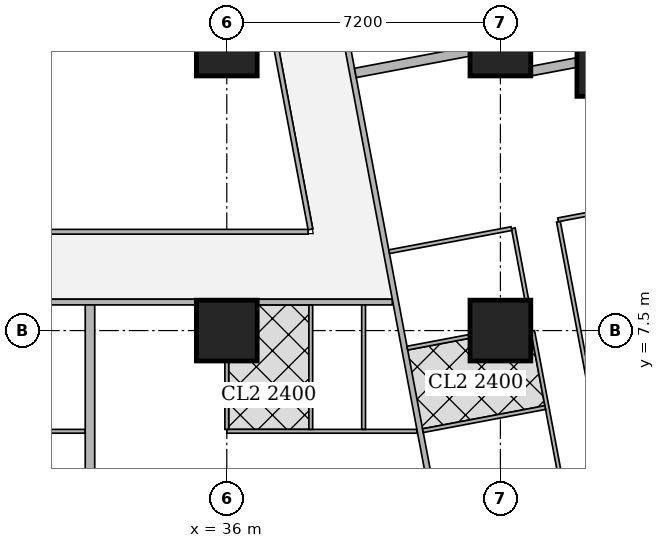
"""IFC4 building model, lengths in metres.
Left out: names, types, materials, properties, quantities, classifications, styles, units other than length and angle.
Written with IfcOpenShell. Run it as: python <this file> out.ifc"""

import sys

from ifc_helpers import new_model, si_unit, direction, frame, frame_2d, origin, origin_2d, place, context, subcontext, project, spatial, rectangle, extrude, element, fill, save


model = new_model("IFC4")
c1 = context("Model", 3, precision=1e-05, world=origin(), true_north=direction((0.0, 1.0)))
c2 = subcontext(c1, "Body", "Model", "MODEL_VIEW")
j1 = project(units=[si_unit("LENGTHUNIT", "METRE"), si_unit("PLANEANGLEUNIT", "RADIAN")], contexts=[c1])
p1 = place(None, origin())
s1 = spatial("IfcSite", under=j1, at=p1, CompositionType="ELEMENT")
p2 = place(p1, origin())
s2 = spatial("IfcBuilding", under=s1, at=p2, CompositionType="ELEMENT")
p3 = place(p2, frame((0.0, 0.0, 100.4)))
s3 = spatial("IfcBuildingStorey", under=s2, at=p3, CompositionType="ELEMENT", Elevation=100.4)
for number, where, z_axis, x_axis in (
    (1, (36.0, 7.5, 0.0), (0.0, 0.0, 1.0), (1.0, 0.0, 0.0)),
    (2, (43.2, 7.5, 0.0), (0.0, 0.0, 1.0), (1.0, 0.0, 0.0)),
    (3, (36.0, 15.0, 0.0), (0.0, 0.0, 1.0), (1.0, 0.0, 0.0)),
    (4, (43.2, 15.0, 0.0), (0.0, 0.0, 1.0), (1.0, 0.0, 0.0)),
):
    element("IfcColumn", number, at=place(p3, frame(where, z_axis=z_axis, x_axis=x_axis)), inside=s3, PredefinedType="COLUMN", context=c2, shape_type="SweptSolid", body=[
        extrude(rectangle(XDim=1.6, YDim=1.6, at=origin_2d()), origin(), (0.0, 0.0, 1.0), 3.75),
    ])
p4 = place(p3, frame((46.314, 14.763, 0.0), z_axis=(0.0, 0.0, 1.0), x_axis=(1.0, 0.0, 0.0)))
e5 = element("IfcColumn", 5, at=p4, inside=s3, PredefinedType="COLUMN", context=c2, shape_type="SweptSolid", body=[
    extrude(rectangle(XDim=2.2, YDim=2.2, at=origin_2d()), origin(), (0.0, 0.0, 1.0), 3.75),
])
p5 = place(p3, frame((50.653, 2.703, 0.0), z_axis=(0.0, 0.0, 1.0), x_axis=(-0.185612026696, 0.982623109613, 0.0)))
e6 = element("IfcWall", 6, at=p5, inside=s3, PredefinedType="SOLIDWALL", context=c2, shape_type="SweptSolid", body=[
    extrude(rectangle(XDim=41.393, YDim=0.2, at=frame_2d((20.697, 0.0))), origin(), (0.0, 0.0, 1.0), 3.5),
])
p6 = place(p5, frame((1.633, 0.0, 0.9)))
e7 = element("IfcOpeningElement", 7, at=p6, cuts=e6, PredefinedType="OPENING", context=c2, shape_type="SweptSolid", body=[
    extrude(rectangle(XDim=1.8, YDim=1.5, at=frame_2d((0.9, 0.75))), frame((0.0, 0.11, 0.0), z_axis=(0.0, -1.0, 0.0), x_axis=(1.0, 0.0, 0.0)), (0.0, 0.0, 1.0), 0.22),
])
p7 = place(p5, frame((6.032, 0.0, 0.9)))
e8 = element("IfcOpeningElement", 8, at=p7, cuts=e6, PredefinedType="OPENING", context=c2, shape_type="SweptSolid", body=[
    extrude(rectangle(XDim=1.8, YDim=1.5, at=frame_2d((0.9, 0.75))), frame((0.0, 0.11, 0.0), z_axis=(0.0, -1.0, 0.0), x_axis=(1.0, 0.0, 0.0)), (0.0, 0.0, 1.0), 0.22),
])
p8 = place(p5, frame((9.848, 0.0, 0.9)))
e9 = element("IfcOpeningElement", 9, at=p8, cuts=e6, PredefinedType="OPENING", context=c2, shape_type="SweptSolid", body=[
    extrude(rectangle(XDim=1.8, YDim=1.5, at=frame_2d((0.9, 0.75))), frame((0.0, 0.11, 0.0), z_axis=(0.0, -1.0, 0.0), x_axis=(1.0, 0.0, 0.0)), (0.0, 0.0, 1.0), 0.22),
])
p9 = place(p5, frame((13.664, 0.0, 0.9)))
e10 = element("IfcOpeningElement", 10, at=p9, cuts=e6, PredefinedType="OPENING", context=c2, shape_type="SweptSolid", body=[
    extrude(rectangle(XDim=1.8, YDim=1.5, at=frame_2d((0.9, 0.75))), frame((0.0, 0.11, 0.0), z_axis=(0.0, -1.0, 0.0), x_axis=(1.0, 0.0, 0.0)), (0.0, 0.0, 1.0), 0.22),
])
p10 = place(p5, frame((17.481, 0.0, 0.9)))
e11 = element("IfcOpeningElement", 11, at=p10, cuts=e6, PredefinedType="OPENING", context=c2, shape_type="SweptSolid", body=[
    extrude(rectangle(XDim=1.8, YDim=1.5, at=frame_2d((0.9, 0.75))), frame((0.0, 0.11, 0.0), z_axis=(0.0, -1.0, 0.0), x_axis=(1.0, 0.0, 0.0)), (0.0, 0.0, 1.0), 0.22),
])
p11 = place(p5, frame((21.297, 0.0, 0.9)))
e12 = element("IfcOpeningElement", 12, at=p11, cuts=e6, PredefinedType="OPENING", context=c2, shape_type="SweptSolid", body=[
    extrude(rectangle(XDim=1.8, YDim=1.5, at=frame_2d((0.9, 0.75))), frame((0.0, 0.11, 0.0), z_axis=(0.0, -1.0, 0.0), x_axis=(1.0, 0.0, 0.0)), (0.0, 0.0, 1.0), 0.22),
])
p12 = place(p5, frame((25.113, 0.0, 0.9)))
e13 = element("IfcOpeningElement", 13, at=p12, cuts=e6, PredefinedType="OPENING", context=c2, shape_type="SweptSolid", body=[
    extrude(rectangle(XDim=1.8, YDim=1.5, at=frame_2d((0.9, 0.75))), frame((0.0, 0.11, 0.0), z_axis=(0.0, -1.0, 0.0), x_axis=(1.0, 0.0, 0.0)), (0.0, 0.0, 1.0), 0.22),
])
p13 = place(p5, frame((28.93, 0.0, 0.9)))
e14 = element("IfcOpeningElement", 14, at=p13, cuts=e6, PredefinedType="OPENING", context=c2, shape_type="SweptSolid", body=[
    extrude(rectangle(XDim=1.8, YDim=1.5, at=frame_2d((0.9, 0.75))), frame((0.0, 0.11, 0.0), z_axis=(0.0, -1.0, 0.0), x_axis=(1.0, 0.0, 0.0)), (0.0, 0.0, 1.0), 0.22),
])
p14 = place(p5, frame((32.746, 0.0, 0.9)))
e15 = element("IfcOpeningElement", 15, at=p14, cuts=e6, PredefinedType="OPENING", context=c2, shape_type="SweptSolid", body=[
    extrude(rectangle(XDim=1.8, YDim=1.5, at=frame_2d((0.9, 0.75))), frame((0.0, 0.11, 0.0), z_axis=(0.0, -1.0, 0.0), x_axis=(1.0, 0.0, 0.0)), (0.0, 0.0, 1.0), 0.22),
])
p15 = place(p5, frame((36.481, 0.0, 0.9)))
e16 = element("IfcOpeningElement", 16, at=p15, cuts=e6, PredefinedType="OPENING", context=c2, shape_type="SweptSolid", body=[
    extrude(rectangle(XDim=1.8, YDim=1.5, at=frame_2d((0.9, 0.75))), frame((0.0, 0.11, 0.0), z_axis=(0.0, -1.0, 0.0), x_axis=(1.0, 0.0, 0.0)), (0.0, 0.0, 1.0), 0.22),
])
p16 = place(p3, frame((40.356, 8.25, 0.0), z_axis=(0.0, 0.0, 1.0), x_axis=(-1.0, 0.0, 0.0)))
e17 = element("IfcWall", 17, at=p16, inside=s3, PredefinedType="SOLIDWALL", context=c2, shape_type="SweptSolid", body=[
    extrude(rectangle(XDim=3.555, YDim=0.15, at=frame_2d((1.777, 0.0))), origin(), (0.0, 0.0, 1.0), 3.5),
])
p17 = place(p3, frame((35.199, 8.25, 0.0), z_axis=(0.0, 0.0, 1.0), x_axis=(-1.0, 0.0, 0.0)))
e18 = element("IfcWall", 18, at=p17, inside=s3, PredefinedType="SOLIDWALL", context=c2, shape_type="SweptSolid", body=[
    extrude(rectangle(XDim=5.598, YDim=0.15, at=frame_2d((2.799, 0.0))), origin(), (0.0, 0.0, 1.0), 3.5),
])
p18 = place(p17, frame((0.699, 0.0, 0.0)))
e19 = element("IfcOpeningElement", 19, at=p18, cuts=e18, PredefinedType="OPENING", context=c2, shape_type="SweptSolid", body=[
    extrude(rectangle(XDim=1.0, YDim=2.1, at=frame_2d((0.5, 1.05))), frame((0.0, 0.085, 0.0), z_axis=(0.0, -1.0, 0.0), x_axis=(1.0, 0.0, 0.0)), (0.0, 0.0, 1.0), 0.17),
])
p19 = place(p3, frame((33.382, 45.65, 0.0), z_axis=(0.0, 0.0, 1.0), x_axis=(0.185593544777, -0.982626600565, 0.0)))
e20 = element("IfcWall", 20, at=p19, inside=s3, PredefinedType="SOLIDWALL", context=c2, shape_type="SweptSolid", body=[
    extrude(rectangle(XDim=47.118, YDim=0.15, at=frame_2d((23.559, 0.0))), origin(), (0.0, 0.0, 1.0), 2.2),
])
p20 = place(p19, frame((10.662, 0.0, 0.0)))
e21 = element("IfcOpeningElement", 21, at=p20, cuts=e20, PredefinedType="OPENING", context=c2, shape_type="SweptSolid", body=[
    extrude(rectangle(XDim=1.0, YDim=2.1, at=frame_2d((0.5, 1.05))), frame((0.0, 0.085, 0.0), z_axis=(0.0, -1.0, 0.0), x_axis=(1.0, 0.0, 0.0)), (0.0, 0.0, 1.0), 0.17),
])
p21 = place(p19, frame((15.237, 0.0, 0.0)))
e22 = element("IfcOpeningElement", 22, at=p21, cuts=e20, PredefinedType="OPENING", context=c2, shape_type="SweptSolid", body=[
    extrude(rectangle(XDim=1.0, YDim=2.1, at=frame_2d((0.5, 1.05))), frame((0.0, 0.085, 0.0), z_axis=(0.0, -1.0, 0.0), x_axis=(1.0, 0.0, 0.0)), (0.0, 0.0, 1.0), 0.17),
])
p22 = place(p19, frame((27.341, 0.0, 0.0)))
e23 = element("IfcOpeningElement", 23, at=p22, cuts=e20, PredefinedType="OPENING", context=c2, shape_type="SweptSolid", body=[
    extrude(rectangle(XDim=1.0, YDim=2.1, at=frame_2d((0.5, 1.05))), frame((0.0, 0.085, 0.0), z_axis=(0.0, -1.0, 0.0), x_axis=(1.0, 0.0, 0.0)), (0.0, 0.0, 1.0), 0.17),
])
p23 = place(p19, frame((33.833, 0.0, 0.0)))
e24 = element("IfcOpeningElement", 24, at=p23, cuts=e20, PredefinedType="OPENING", context=c2, shape_type="SweptSolid", body=[
    extrude(rectangle(XDim=1.0, YDim=2.1, at=frame_2d((0.5, 1.05))), frame((0.0, 0.085, 0.0), z_axis=(0.0, -1.0, 0.0), x_axis=(1.0, 0.0, 0.0)), (0.0, 0.0, 1.0), 0.17),
])
p24 = place(p3, frame((32.275, 4.85, 0.0), z_axis=(0.0, 0.0, 1.0), x_axis=(-1.0, 0.0, 0.0)))
e25 = element("IfcWall", 25, at=p24, inside=s3, PredefinedType="PARTITIONING", context=c2, shape_type="SweptSolid", body=[
    extrude(rectangle(XDim=7.075, YDim=0.1, at=frame_2d((3.538, 0.0))), origin(), (0.0, 0.0, 1.0), 3.5),
])
p25 = place(p24, frame((5.52, 0.0, 0.0)))
e26 = element("IfcOpeningElement", 26, at=p25, cuts=e25, PredefinedType="OPENING", context=c2, shape_type="SweptSolid", body=[
    extrude(rectangle(XDim=0.9, YDim=2.1, at=frame_2d((0.45, 1.05))), frame((0.0, 0.06, 0.0), z_axis=(0.0, -1.0, 0.0), x_axis=(1.0, 0.0, 0.0)), (0.0, 0.0, 1.0), 0.12),
])
p26 = place(p24, frame((2.225, 0.0, 0.0)))
e27 = element("IfcOpeningElement", 27, at=p26, cuts=e25, PredefinedType="OPENING", context=c2, shape_type="SweptSolid", body=[
    extrude(rectangle(XDim=0.9, YDim=2.1, at=frame_2d((0.45, 1.05))), frame((0.0, 0.06, 0.0), z_axis=(0.0, -1.0, 0.0), x_axis=(1.0, 0.0, 0.0)), (0.0, 0.0, 1.0), 0.12),
])
p27 = place(p24, frame((3.72, 0.0, 0.0)))
e28 = element("IfcOpeningElement", 28, at=p27, cuts=e25, PredefinedType="OPENING", context=c2, shape_type="SweptSolid", body=[
    extrude(rectangle(XDim=0.9, YDim=2.1, at=frame_2d((0.45, 1.05))), frame((0.0, 0.06, 0.0), z_axis=(0.0, -1.0, 0.0), x_axis=(1.0, 0.0, 0.0)), (0.0, 0.0, 1.0), 0.12),
])
p28 = place(p24, frame((0.425, 0.0, 0.0)))
e29 = element("IfcOpeningElement", 29, at=p28, cuts=e25, PredefinedType="OPENING", context=c2, shape_type="SweptSolid", body=[
    extrude(rectangle(XDim=0.9, YDim=2.1, at=frame_2d((0.45, 1.05))), frame((0.0, 0.06, 0.0), z_axis=(0.0, -1.0, 0.0), x_axis=(1.0, 0.0, 0.0)), (0.0, 0.0, 1.0), 0.12),
])
p29 = place(p3, frame((41.002, 4.85, 0.0), z_axis=(0.0, 0.0, 1.0), x_axis=(-1.0, 0.0, 0.0)))
e30 = element("IfcWall", 30, at=p29, inside=s3, PredefinedType="PARTITIONING", context=c2, shape_type="SweptSolid", body=[
    extrude(rectangle(XDim=5.002, YDim=0.1, at=frame_2d((2.501, 0.0))), origin(), (0.0, 0.0, 1.0), 3.5),
])
p30 = place(p29, frame((3.447, 0.0, 0.0)))
e31 = element("IfcOpeningElement", 31, at=p30, cuts=e30, PredefinedType="OPENING", context=c2, shape_type="SweptSolid", body=[
    extrude(rectangle(XDim=0.9, YDim=2.1, at=frame_2d((0.45, 1.05))), frame((0.0, 0.06, 0.0), z_axis=(0.0, -1.0, 0.0), x_axis=(1.0, 0.0, 0.0)), (0.0, 0.0, 1.0), 0.12),
])
p31 = place(p29, frame((0.15, 0.0, 0.0)))
e32 = element("IfcOpeningElement", 32, at=p31, cuts=e30, PredefinedType="OPENING", context=c2, shape_type="SweptSolid", body=[
    extrude(rectangle(XDim=0.9, YDim=2.1, at=frame_2d((0.45, 1.05))), frame((0.0, 0.06, 0.0), z_axis=(0.0, -1.0, 0.0), x_axis=(1.0, 0.0, 0.0)), (0.0, 0.0, 1.0), 0.12),
])
p32 = place(p29, frame((1.647, 0.0, 0.0)))
e33 = element("IfcOpeningElement", 33, at=p32, cuts=e30, PredefinedType="OPENING", context=c2, shape_type="SweptSolid", body=[
    extrude(rectangle(XDim=0.9, YDim=2.1, at=frame_2d((0.45, 1.05))), frame((0.0, 0.06, 0.0), z_axis=(0.0, -1.0, 0.0), x_axis=(1.0, 0.0, 0.0)), (0.0, 0.0, 1.0), 0.12),
])
p33 = place(p3, frame((36.0, 4.9, 0.0), z_axis=(0.0, 0.0, 1.0), x_axis=(0.0, 1.0, 0.0)))
e34 = element("IfcWall", 34, at=p33, inside=s3, PredefinedType="PARTITIONING", context=c2, shape_type="SweptSolid", body=[
    extrude(rectangle(XDim=1.799, YDim=0.1, at=frame_2d((0.899, 0.0))), origin(), (0.0, 0.0, 1.0), 3.5),
])
for number, where, z_axis, x_axis in (
    (35, (39.6, 4.9, 0.0), (0.0, 0.0, 1.0), (0.0, 1.0, 0.0)),
    (36, (38.21, 4.9, 0.0), (0.0, 0.0, 1.0), (0.0, 1.0, 0.0)),
):
    element("IfcWall", number, at=place(p3, frame(where, z_axis=z_axis, x_axis=x_axis)), inside=s3, PredefinedType="PARTITIONING", context=c2, shape_type="SweptSolid", body=[
        extrude(rectangle(XDim=3.275, YDim=0.1, at=frame_2d((1.638, 0.0))), origin(), (0.0, 0.0, 1.0), 3.5),
    ])
p34 = place(p3, frame((32.4, 3.65, 0.0), z_axis=(0.0, 0.0, 1.0), x_axis=(0.0, 1.0, 0.0)))
e37 = element("IfcWall", 37, at=p34, inside=s3, PredefinedType="SOLIDWALL", context=c2, shape_type="SweptSolid", body=[
    extrude(rectangle(XDim=4.525, YDim=0.25, at=frame_2d((2.263, 0.0))), origin(), (0.0, 0.0, 1.0), 3.5),
])
p35 = place(p3, frame((44.727, 10.366, 0.0), z_axis=(0.0, 0.0, 1.0), x_axis=(0.185678775129, -0.982610498858, 0.0)))
e38 = element("IfcWall", 38, at=p35, inside=s3, PredefinedType="PARTITIONING", context=c2, shape_type="SweptSolid", body=[
    extrude(rectangle(XDim=7.421, YDim=0.1, at=frame_2d((3.71, 0.0))), origin(), (0.0, 0.0, 1.0), 3.5),
])
p36 = place(p35, frame((0.151, 0.0, 0.0)))
e39 = element("IfcOpeningElement", 39, at=p36, cuts=e38, PredefinedType="OPENING", context=c2, shape_type="SweptSolid", body=[
    extrude(rectangle(XDim=0.9, YDim=2.1, at=frame_2d((0.45, 1.05))), frame((0.0, 0.06, 0.0), z_axis=(0.0, -1.0, 0.0), x_axis=(1.0, 0.0, 0.0)), (0.0, 0.0, 1.0), 0.12),
])
p37 = place(p35, frame((4.55, 0.0, 0.0)))
e40 = element("IfcOpeningElement", 40, at=p37, cuts=e38, PredefinedType="OPENING", context=c2, shape_type="SweptSolid", body=[
    extrude(rectangle(XDim=0.9, YDim=2.1, at=frame_2d((0.45, 1.05))), frame((0.0, 0.06, 0.0), z_axis=(0.0, -1.0, 0.0), x_axis=(1.0, 0.0, 0.0)), (0.0, 0.0, 1.0), 0.12),
])
p38 = place(p3, frame((43.539, 10.192, 0.0), z_axis=(0.0, 0.0, 1.0), x_axis=(0.185366049966, -0.982669541362, 0.0)))
e41 = element("IfcWall", 41, at=p38, inside=s3, PredefinedType="PARTITIONING", context=c2, shape_type="SweptSolid", body=[
    extrude(rectangle(XDim=1.915, YDim=0.1, at=frame_2d((0.958, 0.0))), origin(), (0.0, 0.0, 1.0), 3.5),
])
p39 = place(p3, frame((44.049, 7.49, 0.0), z_axis=(0.0, 0.0, 1.0), x_axis=(0.185666332607, -0.982612849975, 0.0)))
e42 = element("IfcWall", 42, at=p39, inside=s3, PredefinedType="PARTITIONING", context=c2, shape_type="SweptSolid", body=[
    extrude(rectangle(XDim=4.75, YDim=0.1, at=frame_2d((2.375, 0.0))), origin(), (0.0, 0.0, 1.0), 3.5),
])
p40 = place(p39, frame((0.8, 0.0, 0.0)))
e43 = element("IfcOpeningElement", 43, at=p40, cuts=e42, PredefinedType="OPENING", context=c2, shape_type="SweptSolid", body=[
    extrude(rectangle(XDim=0.9, YDim=2.1, at=frame_2d((0.45, 1.05))), frame((0.0, 0.06, 0.0), z_axis=(0.0, -1.0, 0.0), x_axis=(1.0, 0.0, 0.0)), (0.0, 0.0, 1.0), 0.12),
])
p41 = place(p39, frame((2.396, 0.0, 0.0)))
e44 = element("IfcOpeningElement", 44, at=p41, cuts=e42, PredefinedType="OPENING", context=c2, shape_type="SweptSolid", body=[
    extrude(rectangle(XDim=0.9, YDim=2.1, at=frame_2d((0.45, 1.05))), frame((0.0, 0.06, 0.0), z_axis=(0.0, -1.0, 0.0), x_axis=(1.0, 0.0, 0.0)), (0.0, 0.0, 1.0), 0.12),
])
p42 = place(p3, frame((48.943, 11.213, 0.0), z_axis=(0.0, 0.0, 1.0), x_axis=(-0.982633535512, -0.185556823879, 0.0)))
e45 = element("IfcWall", 45, at=p42, inside=s3, PredefinedType="PARTITIONING", context=c2, shape_type="SweptSolid", body=[
    extrude(rectangle(XDim=4.3, YDim=0.1, at=frame_2d((2.15, 0.0))), origin(), (0.0, 0.0, 1.0), 2.2),
])
p43 = place(p3, frame((43.49, 10.183, 0.0), z_axis=(0.0, 0.0, 1.0), x_axis=(-0.982607026909, -0.185697147715, 0.0)))
e46 = element("IfcWall", 46, at=p43, inside=s3, PredefinedType="PARTITIONING", context=c2, shape_type="SweptSolid", body=[
    extrude(rectangle(XDim=3.275, YDim=0.1, at=frame_2d((1.637, 0.0))), origin(), (0.0, 0.0, 1.0), 3.5),
])
p44 = place(p43, frame((1.2, 0.0, 0.0)))
e47 = element("IfcOpeningElement", 47, at=p44, cuts=e46, PredefinedType="OPENING", context=c2, shape_type="SweptSolid", body=[
    extrude(rectangle(XDim=0.9, YDim=2.1, at=frame_2d((0.45, 1.05))), frame((0.0, 0.06, 0.0), z_axis=(0.0, -1.0, 0.0), x_axis=(1.0, 0.0, 0.0)), (0.0, 0.0, 1.0), 0.12),
])
p45 = place(p3, frame((42.39, 7.348, 0.0), z_axis=(0.0, 0.0, 1.0), x_axis=(-0.9825976927, -0.185746532405, 0.0)))
e48 = element("IfcWall", 48, at=p45, inside=s3, PredefinedType="PARTITIONING", context=c2, shape_type="SweptSolid", body=[
    extrude(rectangle(XDim=1.668, YDim=0.1, at=frame_2d((0.834, 0.0))), origin(), (0.0, 0.0, 1.0), 3.5),
])
p46 = place(p3, frame((44.379, 5.474, 0.0), z_axis=(0.0, 0.0, 1.0), x_axis=(-0.982607026909, -0.185697147715, 0.0)))
e49 = element("IfcWall", 49, at=p46, inside=s3, PredefinedType="PARTITIONING", context=c2, shape_type="SweptSolid", body=[
    extrude(rectangle(XDim=3.275, YDim=0.1, at=frame_2d((1.637, 0.0))), origin(), (0.0, 0.0, 1.0), 3.5),
])
p47 = place(p3, frame((45.19, 14.55, 0.0), z_axis=(0.0, 0.0, 1.0), x_axis=(-0.982666604435, -0.185381618634, 0.0)))
e50 = element("IfcWall", 50, at=p47, inside=s3, PredefinedType="SOLIDWALL", context=c2, shape_type="SweptSolid", body=[
    extrude(rectangle(XDim=1.187, YDim=0.25, at=frame_2d((0.593, 0.0))), origin(), (0.0, 0.0, 1.0), 3.5),
])
p48 = place(p3, frame((42.376, 14.844, 0.0), z_axis=(0.0, 0.0, 1.0), x_axis=(-0.982636286056, -0.185542257522, 0.0)))
e51 = element("IfcWall", 51, at=p48, inside=s3, PredefinedType="SOLIDWALL", context=c2, shape_type="SweptSolid", body=[
    extrude(rectangle(XDim=3.045, YDim=0.25, at=frame_2d((1.522, 0.0))), origin(), (0.0, 0.0, 1.0), 3.5),
])
p49 = place(p3, frame((28.95, 10.1, 0.0), z_axis=(0.0, 0.0, 1.0), x_axis=(1.0, 0.0, 0.0)))
e52 = element("IfcWall", 52, at=p49, inside=s3, PredefinedType="PARTITIONING", context=c2, shape_type="SweptSolid", body=[
    extrude(rectangle(XDim=9.188, YDim=0.125, at=frame_2d((4.594, 0.0))), origin(), (0.0, 0.0, 1.0), 3.5),
])
p50 = place(p3, frame((38.202, 10.163, 0.0), z_axis=(0.0, 0.0, 1.0), x_axis=(-0.185610321132, 0.982623431783, 0.0)))
e53 = element("IfcWall", 53, at=p50, inside=s3, PredefinedType="PARTITIONING", context=c2, shape_type="SweptSolid", body=[
    extrude(rectangle(XDim=25.111, YDim=0.125, at=frame_2d((12.556, 0.0))), origin(), (0.0, 0.0, 1.0), 2.5),
])
p51 = place(p50, frame((0.708, 0.0, 0.0)))
e54 = element("IfcOpeningElement", 54, at=p51, cuts=e53, PredefinedType="OPENING", context=c2, shape_type="SweptSolid", body=[
    extrude(rectangle(XDim=1.0, YDim=2.1, at=frame_2d((0.5, 1.05))), frame((0.0, 0.073, 0.0), z_axis=(0.0, -1.0, 0.0), x_axis=(1.0, 0.0, 0.0)), (0.0, 0.0, 1.0), 0.145),
])
p52 = place(p50, frame((6.0, 0.0, 0.0)))
e55 = element("IfcOpeningElement", 55, at=p52, cuts=e53, PredefinedType="OPENING", context=c2, shape_type="SweptSolid", body=[
    extrude(rectangle(XDim=1.0, YDim=2.1, at=frame_2d((0.5, 1.05))), frame((0.0, 0.073, 0.0), z_axis=(0.0, -1.0, 0.0), x_axis=(1.0, 0.0, 0.0)), (0.0, 0.0, 1.0), 0.145),
])
p53 = place(p50, frame((13.378, 0.0, 0.0)))
e56 = element("IfcOpeningElement", 56, at=p53, cuts=e53, PredefinedType="OPENING", context=c2, shape_type="SweptSolid", body=[
    extrude(rectangle(XDim=1.0, YDim=2.1, at=frame_2d((0.5, 1.05))), frame((0.0, 0.073, 0.0), z_axis=(0.0, -1.0, 0.0), x_axis=(1.0, 0.0, 0.0)), (0.0, 0.0, 1.0), 0.145),
])
p54 = place(p50, frame((21.25, 0.0, 0.0)))
e57 = element("IfcOpeningElement", 57, at=p54, cuts=e53, PredefinedType="OPENING", context=c2, shape_type="SweptSolid", body=[
    extrude(rectangle(XDim=1.0, YDim=2.1, at=frame_2d((0.5, 1.05))), frame((0.0, 0.073, 0.0), z_axis=(0.0, -1.0, 0.0), x_axis=(1.0, 0.0, 0.0)), (0.0, 0.0, 1.0), 0.145),
])
p55 = place(p28, origin())
e58 = element("IfcDoor", 58, at=p55, inside=s3, OperationType="SINGLE_SWING_RIGHT", PredefinedType="DOOR", context=c2, shape_type="SweptSolid", body=[
    extrude(rectangle(XDim=0.9, YDim=2.1, at=frame_2d((0.45, 1.05))), frame((0.0, 0.025, 0.0), z_axis=(0.0, -1.0, 0.0), x_axis=(1.0, 0.0, 0.0)), (0.0, 0.0, 1.0), 0.05),
])
fill(e29, e58)
p56 = place(p30, origin())
e59 = element("IfcDoor", 59, at=p56, inside=s3, OperationType="SINGLE_SWING_LEFT", PredefinedType="DOOR", context=c2, shape_type="SweptSolid", body=[
    extrude(rectangle(XDim=0.9, YDim=2.1, at=frame_2d((0.45, 1.05))), frame((0.0, 0.025, 0.0), z_axis=(0.0, -1.0, 0.0), x_axis=(1.0, 0.0, 0.0)), (0.0, 0.0, 1.0), 0.05),
])
fill(e31, e59)
p57 = place(p31, origin())
e60 = element("IfcDoor", 60, at=p57, inside=s3, OperationType="SINGLE_SWING_RIGHT", PredefinedType="DOOR", context=c2, shape_type="SweptSolid", body=[
    extrude(rectangle(XDim=0.9, YDim=2.1, at=frame_2d((0.45, 1.05))), frame((0.0, 0.025, 0.0), z_axis=(0.0, -1.0, 0.0), x_axis=(1.0, 0.0, 0.0)), (0.0, 0.0, 1.0), 0.05),
])
fill(e32, e60)
p58 = place(p32, origin())
e61 = element("IfcDoor", 61, at=p58, inside=s3, OperationType="SINGLE_SWING_LEFT", PredefinedType="DOOR", context=c2, shape_type="SweptSolid", body=[
    extrude(rectangle(XDim=0.9, YDim=2.1, at=frame_2d((0.45, 1.05))), frame((0.0, 0.025, 0.0), z_axis=(0.0, -1.0, 0.0), x_axis=(1.0, 0.0, 0.0)), (0.0, 0.0, 1.0), 0.05),
])
fill(e33, e61)
p59 = place(p18, origin())
e62 = element("IfcDoor", 62, at=p59, inside=s3, OperationType="SINGLE_SWING_LEFT", PredefinedType="DOOR", context=c2, shape_type="SweptSolid", body=[
    extrude(rectangle(XDim=1.0, YDim=2.1, at=frame_2d((0.5, 1.05))), frame((0.0, 0.025, 0.0), z_axis=(0.0, -1.0, 0.0), x_axis=(1.0, 0.0, 0.0)), (0.0, 0.0, 1.0), 0.05),
])
fill(e19, e62)
p60 = place(p36, origin())
e63 = element("IfcDoor", 63, at=p60, inside=s3, OperationType="SINGLE_SWING_LEFT", PredefinedType="DOOR", context=c2, shape_type="SweptSolid", body=[
    extrude(rectangle(XDim=0.9, YDim=2.1, at=frame_2d((0.45, 1.05))), frame((0.0, 0.025, 0.0), z_axis=(0.0, -1.0, 0.0), x_axis=(1.0, 0.0, 0.0)), (0.0, 0.0, 1.0), 0.05),
])
fill(e39, e63)
p61 = place(p40, origin())
e64 = element("IfcDoor", 64, at=p61, inside=s3, OperationType="SINGLE_SWING_LEFT", PredefinedType="DOOR", context=c2, shape_type="SweptSolid", body=[
    extrude(rectangle(XDim=0.9, YDim=2.1, at=frame_2d((0.45, 1.05))), frame((0.0, 0.025, 0.0), z_axis=(0.0, -1.0, 0.0), x_axis=(1.0, 0.0, 0.0)), (0.0, 0.0, 1.0), 0.05),
])
fill(e43, e64)
p62 = place(p41, origin())
e65 = element("IfcDoor", 65, at=p62, inside=s3, OperationType="SINGLE_SWING_RIGHT", PredefinedType="DOOR", context=c2, shape_type="SweptSolid", body=[
    extrude(rectangle(XDim=0.9, YDim=2.1, at=frame_2d((0.45, 1.05))), frame((0.0, 0.025, 0.0), z_axis=(0.0, -1.0, 0.0), x_axis=(1.0, 0.0, 0.0)), (0.0, 0.0, 1.0), 0.05),
])
fill(e44, e65)
p63 = place(p23, origin())
e66 = element("IfcDoor", 66, at=p63, inside=s3, OperationType="SINGLE_SWING_LEFT", PredefinedType="DOOR", context=c2, shape_type="SweptSolid", body=[
    extrude(rectangle(XDim=1.0, YDim=2.1, at=frame_2d((0.5, 1.05))), frame((0.0, 0.025, 0.0), z_axis=(0.0, -1.0, 0.0), x_axis=(1.0, 0.0, 0.0)), (0.0, 0.0, 1.0), 0.05),
])
fill(e24, e66)
p64 = place(p44, origin())
e67 = element("IfcDoor", 67, at=p64, inside=s3, OperationType="SINGLE_SWING_RIGHT", PredefinedType="DOOR", context=c2, shape_type="SweptSolid", body=[
    extrude(rectangle(XDim=0.9, YDim=2.1, at=frame_2d((0.45, 1.05))), frame((0.0, 0.025, 0.0), z_axis=(0.0, -1.0, 0.0), x_axis=(1.0, 0.0, 0.0)), (0.0, 0.0, 1.0), 0.05),
])
fill(e47, e67)
p65 = place(p51, origin())
e68 = element("IfcDoor", 68, at=p65, inside=s3, OperationType="SINGLE_SWING_LEFT", PredefinedType="DOOR", context=c2, shape_type="SweptSolid", body=[
    extrude(rectangle(XDim=1.0, YDim=2.1, at=frame_2d((0.5, 1.05))), frame((0.0, 0.025, 0.0), z_axis=(0.0, -1.0, 0.0), x_axis=(1.0, 0.0, 0.0)), (0.0, 0.0, 1.0), 0.05),
])
fill(e54, e68)
save(model, sys.argv[1])
